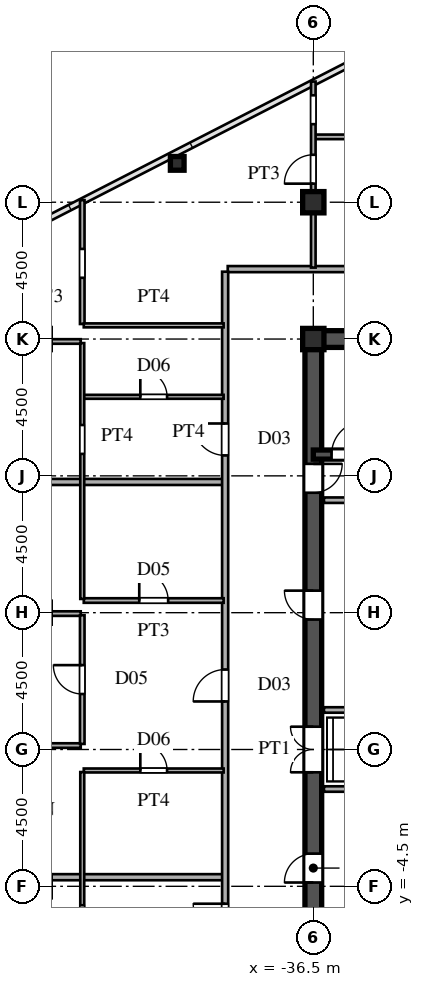
"""IFC4 building model, lengths in metres.
Left out: names, types, materials, properties, quantities, classifications, styles, units other than length and angle.
Written with IfcOpenShell. Run it as: python <this file> out.ifc"""

import sys

from ifc_helpers import new_model, si_unit, direction, frame, frame_2d, origin, origin_2d, place, context, subcontext, project, spatial, rectangle, hollow_rectangle, i_section, extrude, source, transform, mapped, element, fill, save


model = new_model("IFC4")
c1 = context("Model", 3, precision=1e-05, world=origin(), true_north=direction((0.0, 1.0)))
c2 = subcontext(c1, "Body", "Model", "MODEL_VIEW")
j1 = project(units=[si_unit("LENGTHUNIT", "METRE"), si_unit("PLANEANGLEUNIT", "RADIAN")], contexts=[c1])
p1 = place(None, origin())
s1 = spatial("IfcSite", under=j1, at=p1, CompositionType="ELEMENT")
p2 = place(p1, origin())
s2 = spatial("IfcBuilding", under=s1, at=p2, CompositionType="ELEMENT")
p3 = place(p2, frame((0.0, 0.0, 154.8)))
s3 = spatial("IfcBuildingStorey", under=s2, at=p3, CompositionType="ELEMENT", Elevation=154.8)
m1 = source(origin(), c2, "Body", "SweptSolid", [
    extrude(i_section(OverallWidth=0.7, OverallDepth=0.7, WebThickness=0.028, FlangeThickness=0.045, at=origin_2d()), origin(), (0.0, 0.0, 1.0), 3.6),
])
for number, where, z_axis, x_axis in (
    (1, (-36.5, 13.5, 0.0), (0.0, 0.0, 1.0), (1.0, 0.0, 0.0)),
    (2, (-36.5, 18.0, 0.0), (0.0, 0.0, 1.0), (1.0, 0.0, 0.0)),
):
    element("IfcColumn", number, at=place(p3, frame(where, z_axis=z_axis, x_axis=x_axis)), inside=s3, PredefinedType="COLUMN", context=c2, shape_type="MappedRepresentation", body=[
        mapped(m1, transform((0.0, 0.0, 0.0), scale=1.0)),
    ])
m2 = source(origin(), c2, "Body", "SweptSolid", [
    extrude(hollow_rectangle(XDim=0.45, YDim=0.45, WallThickness=0.018, at=origin_2d()), origin(), (0.0, 0.0, 1.0), 3.6),
])
p4 = place(p3, frame((-40.976, 19.278, 0.0), z_axis=(0.0, 0.0, 1.0), x_axis=(1.0, 0.0, 0.0)))
e3 = element("IfcColumn", 3, at=p4, inside=s3, PredefinedType="COLUMN", context=c2, shape_type="MappedRepresentation", body=[
    mapped(m2, transform((0.0, 0.0, 0.0), scale=1.0)),
])
p5 = place(p3, frame((-36.5, 13.5, 0.0), z_axis=(0.0, 0.0, 1.0), x_axis=(1.0, 0.0, 0.0)))
e4 = element("IfcWall", 4, at=p5, inside=s3, PredefinedType="SHEAR", context=c2, shape_type="SweptSolid", body=[
    extrude(rectangle(XDim=9.0, YDim=0.55, at=frame_2d((4.5, 0.0))), origin(), (0.0, 0.0, 1.0), 3.38),
])
p6 = place(p3, frame((-36.5, -1.3, 0.0), z_axis=(0.0, 0.0, 1.0), x_axis=(0.0, 1.0, 0.0)))
e5 = element("IfcWall", 5, at=p6, inside=s3, PredefinedType="SHEAR", context=c2, shape_type="SweptSolid", body=[
    extrude(rectangle(XDim=2.6, YDim=0.55, at=frame_2d((1.3, 0.0))), origin(), (0.0, 0.0, 1.0), 3.38),
])
p7 = place(p6, frame((0.55, 0.0, 0.0)))
e6 = element("IfcOpeningElement", 6, at=p7, cuts=e5, PredefinedType="OPENING", context=c2, shape_type="SweptSolid", body=[
    extrude(rectangle(XDim=1.5, YDim=2.3, at=frame_2d((0.75, 1.15))), frame((0.0, 0.285, 0.0), z_axis=(0.0, -1.0, 0.0), x_axis=(1.0, 0.0, 0.0)), (0.0, 0.0, 1.0), 0.57),
])
p8 = place(p3, frame((-36.5, 8.2, 0.0), z_axis=(0.0, 0.0, 1.0), x_axis=(0.0, 1.0, 0.0)))
e7 = element("IfcWall", 7, at=p8, inside=s3, PredefinedType="SHEAR", context=c2, shape_type="SweptSolid", body=[
    extrude(rectangle(XDim=5.45, YDim=0.55, at=frame_2d((2.725, 0.0))), origin(), (0.0, 0.0, 1.0), 3.38),
])
p9 = place(p8, frame((0.245, 0.0, 0.0)))
e8 = element("IfcOpeningElement", 8, at=p9, cuts=e7, PredefinedType="OPENING", context=c2, shape_type="SweptSolid", body=[
    extrude(rectangle(XDim=0.95, YDim=2.15, at=frame_2d((0.475, 1.075))), frame((0.0, 0.285, 0.0), z_axis=(0.0, -1.0, 0.0), x_axis=(1.0, 0.0, 0.0)), (0.0, 0.0, 1.0), 0.57),
])
p10 = place(p3, frame((-36.5, -6.5, 0.0), z_axis=(0.0, 0.0, 1.0), x_axis=(0.0, 1.0, 0.0)))
e9 = element("IfcWall", 9, at=p10, inside=s3, PredefinedType="SHEAR", context=c2, shape_type="SweptSolid", body=[
    extrude(rectangle(XDim=5.2, YDim=0.55, at=frame_2d((2.6, 0.0))), origin(), (0.0, 0.0, 1.0), 3.38),
])
p11 = place(p10, frame((2.125, 0.0, 0.0)))
e10 = element("IfcOpeningElement", 10, at=p11, cuts=e9, PredefinedType="OPENING", context=c2, shape_type="SweptSolid", body=[
    extrude(rectangle(XDim=0.95, YDim=2.15, at=frame_2d((0.475, 1.075))), frame((0.0, 0.285, 0.0), z_axis=(0.0, -1.0, 0.0), x_axis=(1.0, 0.0, 0.0)), (0.0, 0.0, 1.0), 0.57),
])
p12 = place(p3, frame((-36.5, 1.3, 0.0), z_axis=(0.0, 0.0, 1.0), x_axis=(0.0, 1.0, 0.0)))
e11 = element("IfcWall", 11, at=p12, inside=s3, PredefinedType="SHEAR", context=c2, shape_type="SweptSolid", body=[
    extrude(rectangle(XDim=6.9, YDim=0.55, at=frame_2d((3.45, 0.0))), origin(), (0.0, 0.0, 1.0), 3.38),
])
p13 = place(p12, frame((2.975, 0.0, 0.0)))
e12 = element("IfcOpeningElement", 12, at=p13, cuts=e11, PredefinedType="OPENING", context=c2, shape_type="SweptSolid", body=[
    extrude(rectangle(XDim=0.95, YDim=2.15, at=frame_2d((0.475, 1.075))), frame((0.0, 0.285, 0.0), z_axis=(0.0, -1.0, 0.0), x_axis=(1.0, 0.0, 0.0)), (0.0, 0.0, 1.0), 0.57),
])
p14 = place(p3, frame((-36.5, 9.7, 0.0), z_axis=(0.0, 0.0, 1.0), x_axis=(1.0, 0.0, 0.0)))
e13 = element("IfcWall", 13, at=p14, inside=s3, PredefinedType="SHEAR", context=c2, shape_type="SweptSolid", body=[
    extrude(rectangle(XDim=9.0, YDim=0.3, at=frame_2d((4.5, 0.0))), origin(), (0.0, 0.0, 1.0), 3.38),
])
p15 = place(p14, frame((0.6, 0.0, 0.0)))
e14 = element("IfcOpeningElement", 14, at=p15, cuts=e13, PredefinedType="OPENING", context=c2, shape_type="SweptSolid", body=[
    extrude(rectangle(XDim=1.1, YDim=2.2, at=frame_2d((0.55, 1.1))), frame((0.0, 0.16, 0.0), z_axis=(0.0, -1.0, 0.0), x_axis=(1.0, 0.0, 0.0)), (0.0, 0.0, 1.0), 0.32),
])
p16 = place(p3, frame((-36.15, 8.2, 0.0), z_axis=(0.0, 0.0, 1.0), x_axis=(1.0, 0.0, 0.0)))
e15 = element("IfcWall", 15, at=p16, inside=s3, PredefinedType="PARTITIONING", context=c2, shape_type="SweptSolid", body=[
    extrude(rectangle(XDim=5.7, YDim=0.18, at=frame_2d((2.85, 0.0))), origin(), (0.0, 0.0, 1.0), 3.38),
])
for number, where, z_axis, x_axis in (
    (16, (-36.15, -1.3, 0.0), (0.0, 0.0, 1.0), (1.0, 0.0, 0.0)),
    (17, (-36.15, 1.3, 0.0), (0.0, 0.0, 1.0), (1.0, 0.0, 0.0)),
):
    element("IfcWall", number, at=place(p3, frame(where, z_axis=z_axis, x_axis=x_axis)), inside=s3, PredefinedType="PARTITIONING", context=c2, shape_type="SweptSolid", body=[
        extrude(rectangle(XDim=2.95, YDim=0.18, at=frame_2d((1.475, 0.0))), origin(), (0.0, 0.0, 1.0), 3.38),
    ])
p17 = place(p3, frame((-69.375, -4.2, 0.0), z_axis=(0.0, 0.0, 1.0), x_axis=(1.0, 0.0, 0.0)))
e18 = element("IfcWall", 18, at=p17, inside=s3, PredefinedType="PARTITIONING", context=c2, shape_type="SweptSolid", body=[
    extrude(rectangle(XDim=29.895, YDim=0.2, at=frame_2d((14.948, 0.0))), origin(), (0.0, 0.0, 1.0), 3.38),
])
p18 = place(p3, frame((-44.05, -0.69, 0.0), z_axis=(0.0, 0.0, 1.0), x_axis=(1.0, 0.0, 0.0)))
e19 = element("IfcWall", 19, at=p18, inside=s3, PredefinedType="PARTITIONING", context=c2, shape_type="SweptSolid", body=[
    extrude(rectangle(XDim=4.6, YDim=0.13, at=frame_2d((2.3, 0.0))), origin(), (0.0, 0.0, 1.0), 3.38),
])
p19 = place(p18, frame((1.86, 0.0, 0.0)))
e20 = element("IfcOpeningElement", 20, at=p19, cuts=e19, PredefinedType="OPENING", context=c2, shape_type="SweptSolid", body=[
    extrude(rectangle(XDim=0.88, YDim=2.1, at=frame_2d((0.44, 1.05))), frame((0.0, 0.075, 0.0), z_axis=(0.0, -1.0, 0.0), x_axis=(1.0, 0.0, 0.0)), (0.0, 0.0, 1.0), 0.15),
])
p20 = place(p3, frame((-69.535, 0.13, 0.0), z_axis=(0.0, 0.0, 1.0), x_axis=(1.0, 0.0, 0.0)))
e21 = element("IfcWall", 21, at=p20, inside=s3, PredefinedType="PARTITIONING", context=c2, shape_type="SweptSolid", body=[
    extrude(rectangle(XDim=25.385, YDim=0.15, at=frame_2d((12.692, 0.0))), origin(), (0.0, 0.0, 1.0), 3.38),
])
p21 = place(p20, frame((19.76, 0.0, 0.0)))
e22 = element("IfcOpeningElement", 22, at=p21, cuts=e21, PredefinedType="OPENING", context=c2, shape_type="SweptSolid", body=[
    extrude(rectangle(XDim=0.95, YDim=2.15, at=frame_2d((0.475, 1.075))), frame((0.0, 0.085, 0.0), z_axis=(0.0, -1.0, 0.0), x_axis=(1.0, 0.0, 0.0)), (0.0, 0.0, 1.0), 0.17),
])
p22 = place(p20, frame((11.71, 0.0, 0.0)))
e23 = element("IfcOpeningElement", 23, at=p22, cuts=e21, PredefinedType="OPENING", context=c2, shape_type="SweptSolid", body=[
    extrude(rectangle(XDim=0.95, YDim=2.15, at=frame_2d((0.475, 1.075))), frame((0.0, 0.085, 0.0), z_axis=(0.0, -1.0, 0.0), x_axis=(1.0, 0.0, 0.0)), (0.0, 0.0, 1.0), 0.17),
])
p23 = place(p3, frame((-69.375, 4.47, 0.0), z_axis=(0.0, 0.0, 1.0), x_axis=(1.0, 0.0, 0.0)))
e24 = element("IfcWall", 24, at=p23, inside=s3, PredefinedType="PARTITIONING", context=c2, shape_type="SweptSolid", body=[
    extrude(rectangle(XDim=25.225, YDim=0.15, at=frame_2d((12.613, 0.0))), origin(), (0.0, 0.0, 1.0), 2.78),
])
p24 = place(p23, frame((19.6, 0.0, 0.0)))
e25 = element("IfcOpeningElement", 25, at=p24, cuts=e24, PredefinedType="OPENING", context=c2, shape_type="SweptSolid", body=[
    extrude(rectangle(XDim=0.95, YDim=2.15, at=frame_2d((0.475, 1.075))), frame((0.0, 0.085, 0.0), z_axis=(0.0, -1.0, 0.0), x_axis=(1.0, 0.0, 0.0)), (0.0, 0.0, 1.0), 0.17),
])
p25 = place(p23, frame((11.55, 0.0, 0.0)))
e26 = element("IfcOpeningElement", 26, at=p25, cuts=e24, PredefinedType="OPENING", context=c2, shape_type="SweptSolid", body=[
    extrude(rectangle(XDim=0.95, YDim=2.15, at=frame_2d((0.475, 1.075))), frame((0.0, 0.085, 0.0), z_axis=(0.0, -1.0, 0.0), x_axis=(1.0, 0.0, 0.0)), (0.0, 0.0, 1.0), 0.17),
])
p26 = place(p3, frame((-44.05, 4.9, 0.0), z_axis=(0.0, 0.0, 1.0), x_axis=(1.0, 0.0, 0.0)))
e27 = element("IfcWall", 27, at=p26, inside=s3, PredefinedType="PARTITIONING", context=c2, shape_type="SweptSolid", body=[
    extrude(rectangle(XDim=4.6, YDim=0.15, at=frame_2d((2.3, 0.0))), origin(), (0.0, 0.0, 1.0), 3.38),
])
p27 = place(p26, frame((1.825, 0.0, 0.0)))
e28 = element("IfcOpeningElement", 28, at=p27, cuts=e27, PredefinedType="OPENING", context=c2, shape_type="SweptSolid", body=[
    extrude(rectangle(XDim=0.95, YDim=2.15, at=frame_2d((0.475, 1.075))), frame((0.0, 0.085, 0.0), z_axis=(0.0, -1.0, 0.0), x_axis=(1.0, 0.0, 0.0)), (0.0, 0.0, 1.0), 0.17),
])
p28 = place(p3, frame((-62.106, 8.8, 0.0), z_axis=(0.0, 0.0, 1.0), x_axis=(1.0, 0.0, 0.0)))
e29 = element("IfcWall", 29, at=p28, inside=s3, PredefinedType="PARTITIONING", context=c2, shape_type="SweptSolid", body=[
    extrude(rectangle(XDim=22.626, YDim=0.2, at=frame_2d((11.313, 0.0))), origin(), (0.0, 0.0, 1.0), 3.38),
])
p29 = place(p3, frame((-44.05, 11.6, 0.0), z_axis=(0.0, 0.0, 1.0), x_axis=(1.0, 0.0, 0.0)))
e30 = element("IfcWall", 30, at=p29, inside=s3, PredefinedType="PARTITIONING", context=c2, shape_type="SweptSolid", body=[
    extrude(rectangle(XDim=4.6, YDim=0.13, at=frame_2d((2.3, 0.0))), origin(), (0.0, 0.0, 1.0), 3.38),
])
p30 = place(p29, frame((1.86, 0.0, 0.0)))
e31 = element("IfcOpeningElement", 31, at=p30, cuts=e30, PredefinedType="OPENING", context=c2, shape_type="SweptSolid", body=[
    extrude(rectangle(XDim=0.88, YDim=2.1, at=frame_2d((0.44, 1.05))), frame((0.0, 0.075, 0.0), z_axis=(0.0, -1.0, 0.0), x_axis=(1.0, 0.0, 0.0)), (0.0, 0.0, 1.0), 0.15),
])
p31 = place(p3, frame((-45.465, 13.42, 0.0), z_axis=(0.0, 0.0, 1.0), x_axis=(1.0, 0.0, 0.0)))
e32 = element("IfcWall", 32, at=p31, inside=s3, PredefinedType="PARTITIONING", context=c2, shape_type="SweptSolid", body=[
    extrude(rectangle(XDim=1.315, YDim=0.15, at=frame_2d((0.658, 0.0))), origin(), (0.0, 0.0, 1.0), 2.78),
])
p32 = place(p3, frame((-44.05, 13.95, 0.0), z_axis=(0.0, 0.0, 1.0), x_axis=(1.0, 0.0, 0.0)))
e33 = element("IfcWall", 33, at=p32, inside=s3, PredefinedType="PARTITIONING", context=c2, shape_type="SweptSolid", body=[
    extrude(rectangle(XDim=4.6, YDim=0.13, at=frame_2d((2.3, 0.0))), origin(), (0.0, 0.0, 1.0), 3.38),
])
p33 = place(p3, frame((-39.315, 15.8, 0.0), z_axis=(0.0, 0.0, 1.0), x_axis=(1.0, 0.0, 0.0)))
e34 = element("IfcWall", 34, at=p33, inside=s3, PredefinedType="PARTITIONING", context=c2, shape_type="SweptSolid", body=[
    extrude(rectangle(XDim=11.815, YDim=0.2, at=frame_2d((5.907, 0.0))), origin(), (0.0, 0.0, 1.0), 3.38),
])
p34 = place(p3, frame((-36.45, 20.15, 0.0), z_axis=(0.0, 0.0, 1.0), x_axis=(1.0, 0.0, 0.0)))
e35 = element("IfcWall", 35, at=p34, inside=s3, PredefinedType="PARTITIONING", context=c2, shape_type="SweptSolid", body=[
    extrude(rectangle(XDim=8.649, YDim=0.15, at=frame_2d((4.325, 0.0))), origin(), (0.0, 0.0, 1.0), 3.38),
])
p35 = place(p3, frame((-44.1, -8.761, 0.0), z_axis=(0.0, 0.0, 1.0), x_axis=(0.0, 1.0, 0.0)))
e36 = element("IfcWall", 36, at=p35, inside=s3, PredefinedType="PARTITIONING", context=c2, shape_type="SweptSolid", body=[
    extrude(rectangle(XDim=8.019, YDim=0.13, at=frame_2d((4.01, 0.0))), origin(), (0.0, 0.0, 1.0), 3.38),
])
p36 = place(p35, frame((2.688, 0.0, 0.0)))
e37 = element("IfcOpeningElement", 37, at=p36, cuts=e36, PredefinedType="OPENING", context=c2, shape_type="SweptSolid", body=[
    extrude(rectangle(XDim=0.95, YDim=2.15, at=frame_2d((0.475, 1.075))), frame((0.0, 0.075, 0.0), z_axis=(0.0, -1.0, 0.0), x_axis=(1.0, 0.0, 0.0)), (0.0, 0.0, 1.0), 0.15),
])
p37 = place(p3, frame((-44.1, 0.183, 0.0), z_axis=(0.0, 0.0, 1.0), x_axis=(0.0, 1.0, 0.0)))
e38 = element("IfcWall", 38, at=p37, inside=s3, PredefinedType="PARTITIONING", context=c2, shape_type="SweptSolid", body=[
    extrude(rectangle(XDim=4.234, YDim=0.15, at=frame_2d((2.117, 0.0))), origin(), (0.0, 0.0, 1.0), 3.38),
])
p38 = place(p37, frame((1.642, 0.0, 0.0)))
e39 = element("IfcOpeningElement", 39, at=p38, cuts=e38, PredefinedType="OPENING", context=c2, shape_type="SweptSolid", body=[
    extrude(rectangle(XDim=0.95, YDim=2.15, at=frame_2d((0.475, 1.075))), frame((0.0, 0.085, 0.0), z_axis=(0.0, -1.0, 0.0), x_axis=(1.0, 0.0, 0.0)), (0.0, 0.0, 1.0), 0.17),
])
p39 = place(p3, frame((-44.1, 4.952, 0.0), z_axis=(0.0, 0.0, 1.0), x_axis=(0.0, 1.0, 0.0)))
e40 = element("IfcWall", 40, at=p39, inside=s3, PredefinedType="PARTITIONING", context=c2, shape_type="SweptSolid", body=[
    extrude(rectangle(XDim=8.415, YDim=0.13, at=frame_2d((4.208, 0.0))), origin(), (0.0, 0.0, 1.0), 3.38),
])
p40 = place(p39, frame((4.771, 0.0, 0.0)))
e41 = element("IfcOpeningElement", 41, at=p40, cuts=e40, PredefinedType="OPENING", context=c2, shape_type="SweptSolid", body=[
    extrude(rectangle(XDim=0.95, YDim=2.15, at=frame_2d((0.475, 1.075))), frame((0.0, 0.075, 0.0), z_axis=(0.0, -1.0, 0.0), x_axis=(1.0, 0.0, 0.0)), (0.0, 0.0, 1.0), 0.15),
])
p41 = place(p3, frame((-44.1, 13.995, 0.0), z_axis=(0.0, 0.0, 1.0), x_axis=(0.0, 1.0, 0.0)))
e42 = element("IfcWall", 42, at=p41, inside=s3, PredefinedType="PARTITIONING", context=c2, shape_type="SweptSolid", body=[
    extrude(rectangle(XDim=4.074, YDim=0.15, at=frame_2d((2.037, 0.0))), origin(), (0.0, 0.0, 1.0), 3.38),
])
p42 = place(p41, frame((1.52, 0.0, 0.0)))
e43 = element("IfcOpeningElement", 43, at=p42, cuts=e42, PredefinedType="OPENING", context=c2, shape_type="SweptSolid", body=[
    extrude(rectangle(XDim=0.95, YDim=2.15, at=frame_2d((0.475, 1.075))), frame((0.0, 0.085, 0.0), z_axis=(0.0, -1.0, 0.0), x_axis=(1.0, 0.0, 0.0)), (0.0, 0.0, 1.0), 0.17),
])
p43 = place(p3, frame((-39.4, -15.715, 0.0), z_axis=(0.0, 0.0, 1.0), x_axis=(0.0, 1.0, 0.0)))
e44 = element("IfcWall", 44, at=p43, inside=s3, PredefinedType="PARTITIONING", context=c2, shape_type="SweptSolid", body=[
    extrude(rectangle(XDim=31.43, YDim=0.2, at=frame_2d((15.715, 0.0))), origin(), (0.0, 0.0, 1.0), 3.38),
])
p44 = place(p43, frame((9.593, 0.0, 0.0)))
e45 = element("IfcOpeningElement", 45, at=p44, cuts=e44, PredefinedType="OPENING", context=c2, shape_type="SweptSolid", body=[
    extrude(rectangle(XDim=1.05, YDim=2.25, at=frame_2d((0.525, 1.125))), frame((0.0, 0.11, 0.0), z_axis=(0.0, -1.0, 0.0), x_axis=(1.0, 0.0, 0.0)), (0.0, 0.0, 1.0), 0.22),
])
p45 = place(p43, frame((17.295, 0.0, 0.0)))
e46 = element("IfcOpeningElement", 46, at=p45, cuts=e44, PredefinedType="OPENING", context=c2, shape_type="SweptSolid", body=[
    extrude(rectangle(XDim=1.05, YDim=2.25, at=frame_2d((0.525, 1.125))), frame((0.0, 0.11, 0.0), z_axis=(0.0, -1.0, 0.0), x_axis=(1.0, 0.0, 0.0)), (0.0, 0.0, 1.0), 0.22),
])
p46 = place(p43, frame((25.387, 0.0, 0.0)))
e47 = element("IfcOpeningElement", 47, at=p46, cuts=e44, PredefinedType="OPENING", context=c2, shape_type="SweptSolid", body=[
    extrude(rectangle(XDim=1.05, YDim=2.25, at=frame_2d((0.525, 1.125))), frame((0.0, 0.11, 0.0), z_axis=(0.0, -1.0, 0.0), x_axis=(1.0, 0.0, 0.0)), (0.0, 0.0, 1.0), 0.22),
])
p47 = place(p3, frame((-36.5, 15.85, 0.0), z_axis=(0.0, 0.0, 1.0), x_axis=(0.0, 1.0, 0.0)))
e48 = element("IfcWall", 48, at=p47, inside=s3, PredefinedType="PARTITIONING", context=c2, shape_type="SweptSolid", body=[
    extrude(rectangle(XDim=2.17, YDim=0.15, at=frame_2d((1.085, 0.0))), origin(), (0.0, 0.0, 1.0), 1.38),
])
p48 = place(p3, frame((-36.5, 18.02, 0.0), z_axis=(0.0, 0.0, 1.0), x_axis=(0.0, 1.0, 0.0)))
e49 = element("IfcWall", 49, at=p48, inside=s3, PredefinedType="PARTITIONING", context=c2, shape_type="SweptSolid", body=[
    extrude(rectangle(XDim=3.949, YDim=0.15, at=frame_2d((1.975, 0.0))), origin(), (0.0, 0.0, 1.0), 3.38),
])
p49 = place(p48, frame((0.591, 0.0, 0.0)))
e50 = element("IfcOpeningElement", 50, at=p49, cuts=e49, PredefinedType="OPENING", context=c2, shape_type="SweptSolid", body=[
    extrude(rectangle(XDim=0.95, YDim=2.15, at=frame_2d((0.475, 1.075))), frame((0.0, 0.085, 0.0), z_axis=(0.0, -1.0, 0.0), x_axis=(1.0, 0.0, 0.0)), (0.0, 0.0, 1.0), 0.17),
])
p50 = place(p48, frame((2.547, 0.0, 0.0)))
e51 = element("IfcOpeningElement", 51, at=p50, cuts=e49, PredefinedType="OPENING", context=c2, shape_type="SweptSolid", body=[
    extrude(rectangle(XDim=0.95, YDim=2.15, at=frame_2d((0.475, 1.075))), frame((0.0, 0.085, 0.0), z_axis=(0.0, -1.0, 0.0), x_axis=(1.0, 0.0, 0.0)), (0.0, 0.0, 1.0), 0.17),
])
m3 = source(origin(), c2, "Body", "SweptSolid", [
    extrude(rectangle(XDim=1.5, YDim=2.3, at=frame_2d((0.75, 1.15))), frame((0.0, 0.025, 0.0), z_axis=(0.0, -1.0, 0.0), x_axis=(1.0, 0.0, 0.0)), (0.0, 0.0, 1.0), 0.05),
])
p51 = place(p7, origin())
e52 = element("IfcDoor", 52, at=p51, inside=s3, OperationType="DOUBLE_SWING_LEFT", PredefinedType="DOOR", context=c2, shape_type="MappedRepresentation", body=[
    mapped(m3, transform((0.0, 0.0, 0.0), scale=1.0)),
])
fill(e6, e52)
m4 = source(origin(), c2, "Body", "SweptSolid", [
    extrude(rectangle(XDim=0.95, YDim=2.15, at=frame_2d((0.475, 1.075))), frame((0.0, 0.025, 0.0), z_axis=(0.0, -1.0, 0.0), x_axis=(1.0, 0.0, 0.0)), (0.0, 0.0, 1.0), 0.05),
])
p52 = place(p9, frame((0.95, 0.0, 0.0), z_axis=(0.0, 0.0, 1.0), x_axis=(-1.0, 0.0, 0.0)))
e53 = element("IfcDoor", 53, at=p52, inside=s3, OperationType="SINGLE_SWING_RIGHT", PredefinedType="DOOR", context=c2, shape_type="MappedRepresentation", body=[
    mapped(m4, transform((0.0, 0.0, 0.0), scale=1.0)),
])
fill(e8, e53)
p53 = place(p11, origin())
e54 = element("IfcDoor", 54, at=p53, inside=s3, OperationType="SINGLE_SWING_LEFT", PredefinedType="DOOR", context=c2, shape_type="MappedRepresentation", body=[
    mapped(m4, transform((0.0, 0.0, 0.0), scale=1.0)),
])
fill(e10, e54)
p54 = place(p13, origin())
e55 = element("IfcDoor", 55, at=p54, inside=s3, OperationType="SINGLE_SWING_RIGHT", PredefinedType="DOOR", context=c2, shape_type="MappedRepresentation", body=[
    mapped(m4, transform((0.0, 0.0, 0.0), scale=1.0)),
])
fill(e12, e55)
m5 = source(origin(), c2, "Body", "SweptSolid", [
    extrude(rectangle(XDim=1.1, YDim=2.2, at=frame_2d((0.55, 1.1))), frame((0.0, 0.025, 0.0), z_axis=(0.0, -1.0, 0.0), x_axis=(1.0, 0.0, 0.0)), (0.0, 0.0, 1.0), 0.05),
])
p55 = place(p15, origin())
e56 = element("IfcDoor", 56, at=p55, inside=s3, OperationType="SINGLE_SWING_RIGHT", PredefinedType="DOOR", context=c2, shape_type="MappedRepresentation", body=[
    mapped(m5, transform((0.0, 0.0, 0.0), scale=1.0)),
])
fill(e14, e56)
m6 = source(origin(), c2, "Body", "SweptSolid", [
    extrude(rectangle(XDim=0.88, YDim=2.1, at=frame_2d((0.44, 1.05))), frame((0.0, 0.025, 0.0), z_axis=(0.0, -1.0, 0.0), x_axis=(1.0, 0.0, 0.0)), (0.0, 0.0, 1.0), 0.05),
])
p56 = place(p19, origin())
e57 = element("IfcDoor", 57, at=p56, inside=s3, OperationType="SINGLE_SWING_LEFT", PredefinedType="DOOR", context=c2, shape_type="MappedRepresentation", body=[
    mapped(m6, transform((0.0, 0.0, 0.0), scale=1.0)),
])
fill(e20, e57)
m7 = source(origin(), c2, "Body", "SweptSolid", [
    extrude(rectangle(XDim=0.95, YDim=2.15, at=frame_2d((0.475, 1.075))), frame((0.0, 0.025, 0.0), z_axis=(0.0, -1.0, 0.0), x_axis=(1.0, 0.0, 0.0)), (0.0, 0.0, 1.0), 0.05),
])
p57 = place(p27, origin())
e58 = element("IfcDoor", 58, at=p57, inside=s3, OperationType="SINGLE_SWING_LEFT", PredefinedType="DOOR", context=c2, shape_type="MappedRepresentation", body=[
    mapped(m7, transform((0.0, 0.0, 0.0), scale=1.0)),
])
fill(e28, e58)
p58 = place(p30, origin())
e59 = element("IfcDoor", 59, at=p58, inside=s3, OperationType="SINGLE_SWING_LEFT", PredefinedType="DOOR", context=c2, shape_type="MappedRepresentation", body=[
    mapped(m6, transform((0.0, 0.0, 0.0), scale=1.0)),
])
fill(e31, e59)
p59 = place(p38, origin())
e60 = element("IfcDoor", 60, at=p59, inside=s3, OperationType="SINGLE_SWING_RIGHT", PredefinedType="DOOR", context=c2, shape_type="MappedRepresentation", body=[
    mapped(m7, transform((0.0, 0.0, 0.0), scale=1.0)),
])
fill(e39, e60)
m8 = source(origin(), c2, "Body", "SweptSolid", [
    extrude(rectangle(XDim=1.05, YDim=2.25, at=frame_2d((0.525, 1.125))), frame((0.0, 0.025, 0.0), z_axis=(0.0, -1.0, 0.0), x_axis=(1.0, 0.0, 0.0)), (0.0, 0.0, 1.0), 0.05),
])
p60 = place(p44, origin())
e61 = element("IfcDoor", 61, at=p60, inside=s3, OperationType="SINGLE_SWING_RIGHT", PredefinedType="DOOR", context=c2, shape_type="MappedRepresentation", body=[
    mapped(m8, transform((0.0, 0.0, 0.0), scale=1.0)),
])
fill(e45, e61)
p61 = place(p45, origin())
e62 = element("IfcDoor", 62, at=p61, inside=s3, OperationType="SINGLE_SWING_LEFT", PredefinedType="DOOR", context=c2, shape_type="MappedRepresentation", body=[
    mapped(m8, transform((0.0, 0.0, 0.0), scale=1.0)),
])
fill(e46, e62)
p62 = place(p46, origin())
e63 = element("IfcDoor", 63, at=p62, inside=s3, OperationType="SINGLE_SWING_RIGHT", PredefinedType="DOOR", context=c2, shape_type="MappedRepresentation", body=[
    mapped(m8, transform((0.0, 0.0, 0.0), scale=1.0)),
])
fill(e47, e63)
p63 = place(p49, origin())
e64 = element("IfcDoor", 64, at=p63, inside=s3, OperationType="SINGLE_SWING_LEFT", PredefinedType="DOOR", context=c2, shape_type="MappedRepresentation", body=[
    mapped(m7, transform((0.0, 0.0, 0.0), scale=1.0)),
])
fill(e50, e64)
save(model, sys.argv[1])
